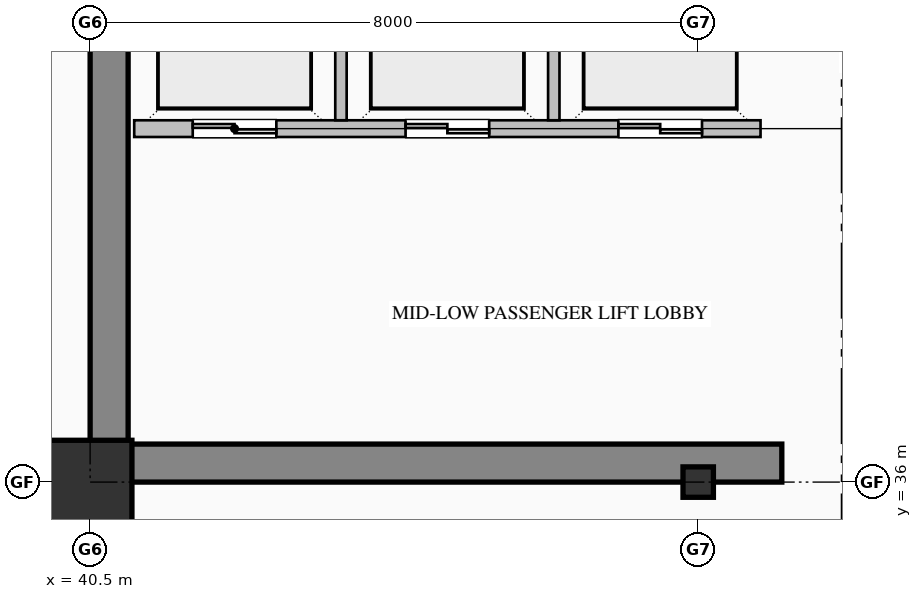
"""IFC4 building model, lengths in metres.
Left out: names, types, materials, properties, quantities, classifications, styles, units other than length and angle.
Written with IfcOpenShell. Run it as: python <this file> out.ifc"""

import sys

from ifc_helpers import new_model, si_unit, direction, frame, frame_2d, origin, origin_2d, place, context, subcontext, project, spatial, rectangle, hollow_rectangle, i_section, extrude, element, fill, save


model = new_model("IFC4")
c1 = context("Model", 3, precision=1e-05, world=origin(), true_north=direction((0.0, 1.0)))
c2 = subcontext(c1, "Body", "Model", "MODEL_VIEW")
j1 = project(units=[si_unit("LENGTHUNIT", "METRE"), si_unit("PLANEANGLEUNIT", "RADIAN")], contexts=[c1])
p1 = place(None, origin())
s1 = spatial("IfcSite", under=j1, at=p1, CompositionType="ELEMENT")
p2 = place(p1, origin())
s2 = spatial("IfcBuilding", under=s1, at=p2, CompositionType="ELEMENT")
p3 = place(p2, frame((0.0, 0.0, 163.0)))
s3 = spatial("IfcBuildingStorey", under=s2, at=p3, CompositionType="ELEMENT", Elevation=163.0)
p4 = place(p3, frame((40.75, 36.5, 0.0), z_axis=(0.0, 0.0, 1.0), x_axis=(0.0, 1.0, 0.0)))
e1 = element("IfcWall", 1, at=p4, inside=s3, PredefinedType="SHEAR", context=c2, shape_type="SweptSolid", body=[
    extrude(rectangle(XDim=7.9, YDim=0.5, at=frame_2d((3.95, 0.0))), origin(), (0.0, 0.0, 1.0), 3.765),
])
p5 = place(p3, frame((40.5, 36.25, 0.0), z_axis=(0.0, 0.0, 1.0), x_axis=(1.0, 0.0, 0.0)))
e2 = element("IfcWall", 2, at=p5, inside=s3, PredefinedType="SHEAR", context=c2, shape_type="SweptSolid", body=[
    extrude(rectangle(XDim=9.1, YDim=0.5, at=frame_2d((4.55, 0.0))), origin(), (0.0, 0.0, 1.0), 3.765),
])
p6 = place(p3, frame((40.5, 36.0, 0.0), z_axis=(0.0, 0.0, 1.0), x_axis=(1.0, 0.0, 0.0)))
e3 = element("IfcColumn", 3, at=p6, inside=s3, PredefinedType="COLUMN", context=c2, shape_type="SweptSolid", body=[
    extrude(hollow_rectangle(XDim=1.1, YDim=1.1, WallThickness=0.04, at=origin_2d()), origin(), (0.0, 0.0, 1.0), 4.0),
])
p7 = place(p3, frame((48.5, 36.0, 0.0), z_axis=(0.0, 0.0, 1.0), x_axis=(1.0, 0.0, 0.0)))
e4 = element("IfcColumn", 4, at=p7, inside=s3, PredefinedType="COLUMN", context=c2, shape_type="SweptSolid", body=[
    extrude(i_section(OverallWidth=0.4, OverallDepth=0.4, WebThickness=0.013, FlangeThickness=0.021, FilletRadius=0.022, at=origin_2d()), origin(), (0.0, 0.0, 1.0), 4.0),
])
p8 = place(p3, frame((49.32, 40.65, 0.0), z_axis=(0.0, 0.0, 1.0), x_axis=(-1.0, 0.0, 0.0)))
e5 = element("IfcWall", 5, at=p8, inside=s3, PredefinedType="PARTITIONING", context=c2, shape_type="SweptSolid", body=[
    extrude(rectangle(XDim=8.24, YDim=0.22, at=frame_2d((4.12, 0.0))), origin(), (0.0, 0.0, 1.0), 3.765),
])
p9 = place(p8, frame((6.37, 0.0, 0.0)))
e6 = element("IfcOpeningElement", 6, at=p9, cuts=e5, PredefinedType="OPENING", context=c2, shape_type="SweptSolid", body=[
    extrude(rectangle(XDim=1.1, YDim=2.2, at=frame_2d((0.55, 1.1))), frame((0.0, 0.12, 0.0), z_axis=(0.0, -1.0, 0.0), x_axis=(1.0, 0.0, 0.0)), (0.0, 0.0, 1.0), 0.24),
])
p10 = place(p8, frame((3.57, 0.0, 0.0)))
e7 = element("IfcOpeningElement", 7, at=p10, cuts=e5, PredefinedType="OPENING", context=c2, shape_type="SweptSolid", body=[
    extrude(rectangle(XDim=1.1, YDim=2.2, at=frame_2d((0.55, 1.1))), frame((0.0, 0.12, 0.0), z_axis=(0.0, -1.0, 0.0), x_axis=(1.0, 0.0, 0.0)), (0.0, 0.0, 1.0), 0.24),
])
p11 = place(p8, frame((0.77, 0.0, 0.0)))
e8 = element("IfcOpeningElement", 8, at=p11, cuts=e5, PredefinedType="OPENING", context=c2, shape_type="SweptSolid", body=[
    extrude(rectangle(XDim=1.1, YDim=2.2, at=frame_2d((0.55, 1.1))), frame((0.0, 0.12, 0.0), z_axis=(0.0, -1.0, 0.0), x_axis=(1.0, 0.0, 0.0)), (0.0, 0.0, 1.0), 0.24),
])
for number, where, z_axis, x_axis in (
    (9, (43.8, 40.76, 0.0), (0.0, 0.0, 1.0), (0.0, 1.0, 0.0)),
    (10, (46.6, 40.76, 0.0), (0.0, 0.0, 1.0), (0.0, 1.0, 0.0)),
):
    element("IfcWall", number, at=place(p3, frame(where, z_axis=z_axis, x_axis=x_axis)), inside=s3, PredefinedType="PARTITIONING", context=c2, shape_type="SweptSolid", body=[
        extrude(rectangle(XDim=2.08, YDim=0.15, at=frame_2d((1.04, 0.0))), origin(), (0.0, 0.0, 1.0), 3.765),
    ])
p12 = place(p9, origin())
e11 = element("IfcDoor", 11, at=p12, inside=s3, OperationType="DOUBLE_DOOR_SLIDING", PredefinedType="DOOR", context=c2, shape_type="SweptSolid", body=[
    extrude(rectangle(XDim=1.1, YDim=2.2, at=frame_2d((0.55, 1.1))), frame((0.0, 0.025, 0.0), z_axis=(0.0, -1.0, 0.0), x_axis=(1.0, 0.0, 0.0)), (0.0, 0.0, 1.0), 0.05),
])
fill(e6, e11)
p13 = place(p10, origin())
e12 = element("IfcDoor", 12, at=p13, inside=s3, OperationType="DOUBLE_DOOR_SLIDING", PredefinedType="DOOR", context=c2, shape_type="SweptSolid", body=[
    extrude(rectangle(XDim=1.1, YDim=2.2, at=frame_2d((0.55, 1.1))), frame((0.0, 0.025, 0.0), z_axis=(0.0, -1.0, 0.0), x_axis=(1.0, 0.0, 0.0)), (0.0, 0.0, 1.0), 0.05),
])
fill(e7, e12)
p14 = place(p11, origin())
e13 = element("IfcDoor", 13, at=p14, inside=s3, OperationType="DOUBLE_DOOR_SLIDING", PredefinedType="DOOR", context=c2, shape_type="SweptSolid", body=[
    extrude(rectangle(XDim=1.1, YDim=2.2, at=frame_2d((0.55, 1.1))), frame((0.0, 0.025, 0.0), z_axis=(0.0, -1.0, 0.0), x_axis=(1.0, 0.0, 0.0)), (0.0, 0.0, 1.0), 0.05),
])
fill(e8, e13)
save(model, sys.argv[1])
